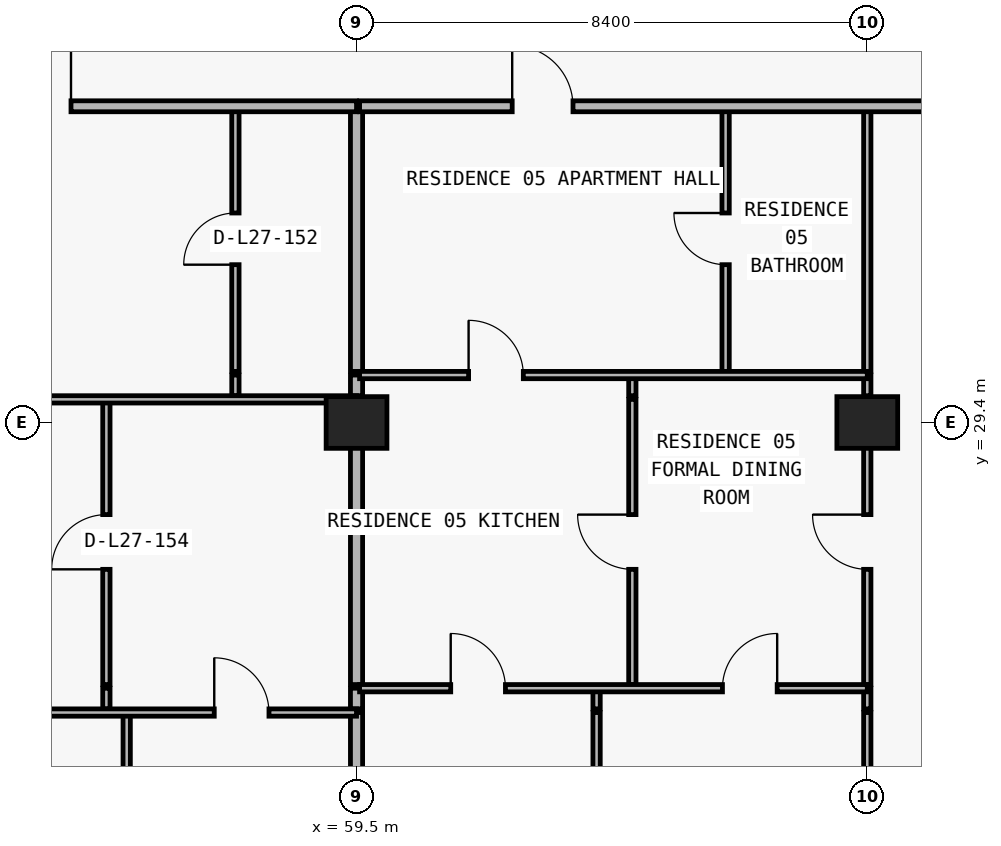
"""IFC4 building model, lengths in metres.
Left out: names, types, materials, properties, quantities, classifications, styles, units other than length and angle.
Written with IfcOpenShell. Run it as: python <this file> out.ifc"""

import sys

from ifc_helpers import new_model, si_unit, direction, frame, frame_2d, origin, origin_2d, place, context, subcontext, project, spatial, rectangle, extrude, element, fill, save


model = new_model("IFC4")
c1 = context("Model", 3, precision=1e-05, world=origin(), true_north=direction((0.0, 1.0)))
c2 = subcontext(c1, "Body", "Model", "MODEL_VIEW")
j1 = project(units=[si_unit("LENGTHUNIT", "METRE"), si_unit("PLANEANGLEUNIT", "RADIAN")], contexts=[c1])
p1 = place(None, origin())
s1 = spatial("IfcSite", under=j1, at=p1, CompositionType="ELEMENT")
p2 = place(p1, origin())
s2 = spatial("IfcBuilding", under=s1, at=p2, CompositionType="ELEMENT")
p3 = place(p2, frame((0.0, 0.0, 102.6)))
s3 = spatial("IfcBuildingStorey", under=s2, at=p3, CompositionType="ELEMENT", Elevation=102.6)
for number, where, z_axis, x_axis in (
    (1, (59.5, 29.4, 0.0), (0.0, 0.0, 1.0), (1.0, 0.0, 0.0)),
    (2, (67.9, 29.4, 0.0), (0.0, 0.0, 1.0), (1.0, 0.0, 0.0)),
):
    element("IfcColumn", number, at=place(p3, frame(where, z_axis=z_axis, x_axis=x_axis)), inside=s3, PredefinedType="COLUMN", context=c2, shape_type="SweptSolid", body=[
        extrude(rectangle(XDim=1.0, YDim=0.85, at=origin_2d()), origin(), (0.0, 0.0, 1.0), 3.05),
    ])
p4 = place(p3, frame((55.386, 24.69, 0.0), z_axis=(0.0, 0.0, 1.0), x_axis=(0.0, 1.0, 0.0)))
e3 = element("IfcWall", 3, at=p4, inside=s3, PredefinedType="PARTITIONING", context=c2, shape_type="SweptSolid", body=[
    extrude(rectangle(XDim=0.34, YDim=0.12, at=frame_2d((0.17, 0.0))), origin(), (0.0, 0.0, 1.0), 3.05),
])
p5 = place(p3, frame((55.386, 25.09, 0.0), z_axis=(0.0, 0.0, 1.0), x_axis=(0.0, 1.0, 0.0)))
e4 = element("IfcWall", 4, at=p5, inside=s3, PredefinedType="PARTITIONING", context=c2, shape_type="SweptSolid", body=[
    extrude(rectangle(XDim=4.69, YDim=0.12, at=frame_2d((2.345, 0.0))), origin(), (0.0, 0.0, 1.0), 2.725),
])
p6 = place(p5, frame((1.895, 0.0, 0.0)))
e5 = element("IfcOpeningElement", 5, at=p6, cuts=e4, PredefinedType="OPENING", context=c2, shape_type="SweptSolid", body=[
    extrude(rectangle(XDim=0.9, YDim=2.15, at=frame_2d((0.45, 1.075))), frame((0.0, 0.07, 0.0), z_axis=(0.0, -1.0, 0.0), x_axis=(1.0, 0.0, 0.0)), (0.0, 0.0, 1.0), 0.14),
])
p7 = place(p3, frame((55.72, 8.84, 0.0), z_axis=(0.0, 0.0, 1.0), x_axis=(0.0, 1.0, 0.0)))
e6 = element("IfcWall", 6, at=p7, inside=s3, PredefinedType="PARTITIONING", context=c2, shape_type="SweptSolid", body=[
    extrude(rectangle(XDim=15.79, YDim=0.12, at=frame_2d((7.895, 0.0))), origin(), (0.0, 0.0, 1.0), 3.05),
])
p8 = place(p3, frame((57.508, 29.84, 0.0), z_axis=(0.0, 0.0, 1.0), x_axis=(0.0, 1.0, 0.0)))
e7 = element("IfcWall", 7, at=p8, inside=s3, PredefinedType="PARTITIONING", context=c2, shape_type="SweptSolid", body=[
    extrude(rectangle(XDim=0.34, YDim=0.12, at=frame_2d((0.17, 0.0))), origin(), (0.0, 0.0, 1.0), 3.05),
])
p9 = place(p3, frame((57.508, 30.24, 0.0), z_axis=(0.0, 0.0, 1.0), x_axis=(0.0, 1.0, 0.0)))
e8 = element("IfcWall", 8, at=p9, inside=s3, PredefinedType="PARTITIONING", context=c2, shape_type="SweptSolid", body=[
    extrude(rectangle(XDim=4.36, YDim=0.12, at=frame_2d((2.18, 0.0))), origin(), (0.0, 0.0, 1.0), 3.05),
])
p10 = place(p9, frame((1.755, 0.0, 0.0)))
e9 = element("IfcOpeningElement", 9, at=p10, cuts=e8, PredefinedType="OPENING", context=c2, shape_type="SweptSolid", body=[
    extrude(rectangle(XDim=0.85, YDim=2.1, at=frame_2d((0.425, 1.05))), frame((0.0, 0.07, 0.0), z_axis=(0.0, -1.0, 0.0), x_axis=(1.0, 0.0, 0.0)), (0.0, 0.0, 1.0), 0.14),
])
p11 = place(p3, frame((59.5, 8.84, 0.0), z_axis=(0.0, 0.0, 1.0), x_axis=(0.0, 1.0, 0.0)))
e10 = element("IfcWall", 10, at=p11, inside=s3, PredefinedType="PARTITIONING", context=c2, shape_type="SweptSolid", body=[
    extrude(rectangle(XDim=15.79, YDim=0.2, at=frame_2d((7.895, 0.0))), origin(), (0.0, 0.0, 1.0), 2.174),
])
p12 = place(p3, frame((59.5, 24.69, 0.0), z_axis=(0.0, 0.0, 1.0), x_axis=(0.0, 1.0, 0.0)))
e11 = element("IfcWall", 11, at=p12, inside=s3, PredefinedType="PARTITIONING", context=c2, shape_type="SweptSolid", body=[
    extrude(rectangle(XDim=0.34, YDim=0.2, at=frame_2d((0.17, 0.0))), origin(), (0.0, 0.0, 1.0), 2.174),
])
p13 = place(p3, frame((59.5, 25.09, 0.0), z_axis=(0.0, 0.0, 1.0), x_axis=(0.0, 1.0, 0.0)))
e12 = element("IfcWall", 12, at=p13, inside=s3, PredefinedType="PARTITIONING", context=c2, shape_type="SweptSolid", body=[
    extrude(rectangle(XDim=4.69, YDim=0.2, at=frame_2d((2.345, 0.0))), origin(), (0.0, 0.0, 1.0), 2.174),
])
p14 = place(p3, frame((59.5, 29.84, 0.0), z_axis=(0.0, 0.0, 1.0), x_axis=(0.0, 1.0, 0.0)))
e13 = element("IfcWall", 13, at=p14, inside=s3, PredefinedType="PARTITIONING", context=c2, shape_type="SweptSolid", body=[
    extrude(rectangle(XDim=0.34, YDim=0.2, at=frame_2d((0.17, 0.0))), origin(), (0.0, 0.0, 1.0), 2.174),
])
p15 = place(p3, frame((59.5, 30.24, 0.0), z_axis=(0.0, 0.0, 1.0), x_axis=(0.0, 1.0, 0.0)))
e14 = element("IfcWall", 14, at=p15, inside=s3, PredefinedType="PARTITIONING", context=c2, shape_type="SweptSolid", body=[
    extrude(rectangle(XDim=4.36, YDim=0.2, at=frame_2d((2.18, 0.0))), origin(), (0.0, 0.0, 1.0), 2.174),
])
p16 = place(p3, frame((63.448, 8.84, 0.0), z_axis=(0.0, 0.0, 1.0), x_axis=(0.0, 1.0, 0.0)))
e15 = element("IfcWall", 15, at=p16, inside=s3, PredefinedType="PARTITIONING", context=c2, shape_type="SweptSolid", body=[
    extrude(rectangle(XDim=15.79, YDim=0.12, at=frame_2d((7.895, 0.0))), origin(), (0.0, 0.0, 1.0), 3.05),
])
p17 = place(p3, frame((63.448, 24.69, 0.0), z_axis=(0.0, 0.0, 1.0), x_axis=(0.0, 1.0, 0.0)))
e16 = element("IfcWall", 16, at=p17, inside=s3, PredefinedType="PARTITIONING", context=c2, shape_type="SweptSolid", body=[
    extrude(rectangle(XDim=0.34, YDim=0.12, at=frame_2d((0.17, 0.0))), origin(), (0.0, 0.0, 1.0), 3.05),
])
p18 = place(p3, frame((64.036, 25.09, 0.0), z_axis=(0.0, 0.0, 1.0), x_axis=(0.0, 1.0, 0.0)))
e17 = element("IfcWall", 17, at=p18, inside=s3, PredefinedType="PARTITIONING", context=c2, shape_type="SweptSolid", body=[
    extrude(rectangle(XDim=4.69, YDim=0.12, at=frame_2d((2.345, 0.0))), origin(), (0.0, 0.0, 1.0), 3.05),
])
p19 = place(p18, frame((1.895, 0.0, 0.0)))
e18 = element("IfcOpeningElement", 18, at=p19, cuts=e17, PredefinedType="OPENING", context=c2, shape_type="SweptSolid", body=[
    extrude(rectangle(XDim=0.9, YDim=2.15, at=frame_2d((0.45, 1.075))), frame((0.0, 0.07, 0.0), z_axis=(0.0, -1.0, 0.0), x_axis=(1.0, 0.0, 0.0)), (0.0, 0.0, 1.0), 0.14),
])
p20 = place(p3, frame((64.036, 29.84, 0.0), z_axis=(0.0, 0.0, 1.0), x_axis=(0.0, 1.0, 0.0)))
e19 = element("IfcWall", 19, at=p20, inside=s3, PredefinedType="PARTITIONING", context=c2, shape_type="SweptSolid", body=[
    extrude(rectangle(XDim=0.34, YDim=0.12, at=frame_2d((0.17, 0.0))), origin(), (0.0, 0.0, 1.0), 3.05),
])
p21 = place(p3, frame((65.57, 30.24, 0.0), z_axis=(0.0, 0.0, 1.0), x_axis=(0.0, 1.0, 0.0)))
e20 = element("IfcWall", 20, at=p21, inside=s3, PredefinedType="PARTITIONING", context=c2, shape_type="SweptSolid", body=[
    extrude(rectangle(XDim=4.36, YDim=0.12, at=frame_2d((2.18, 0.0))), origin(), (0.0, 0.0, 1.0), 3.05),
])
p22 = place(p21, frame((1.755, 0.0, 0.0)))
e21 = element("IfcOpeningElement", 21, at=p22, cuts=e20, PredefinedType="OPENING", context=c2, shape_type="SweptSolid", body=[
    extrude(rectangle(XDim=0.85, YDim=2.1, at=frame_2d((0.425, 1.05))), frame((0.0, 0.07, 0.0), z_axis=(0.0, -1.0, 0.0), x_axis=(1.0, 0.0, 0.0)), (0.0, 0.0, 1.0), 0.14),
])
p23 = place(p3, frame((67.9, 8.84, 0.0), z_axis=(0.0, 0.0, 1.0), x_axis=(0.0, 1.0, 0.0)))
e22 = element("IfcWall", 22, at=p23, inside=s3, PredefinedType="PARTITIONING", context=c2, shape_type="SweptSolid", body=[
    extrude(rectangle(XDim=15.79, YDim=0.12, at=frame_2d((7.895, 0.0))), origin(), (0.0, 0.0, 1.0), 2.174),
])
p24 = place(p3, frame((67.9, 24.69, 0.0), z_axis=(0.0, 0.0, 1.0), x_axis=(0.0, 1.0, 0.0)))
e23 = element("IfcWall", 23, at=p24, inside=s3, PredefinedType="PARTITIONING", context=c2, shape_type="SweptSolid", body=[
    extrude(rectangle(XDim=0.34, YDim=0.12, at=frame_2d((0.17, 0.0))), origin(), (0.0, 0.0, 1.0), 2.174),
])
p25 = place(p3, frame((67.9, 25.09, 0.0), z_axis=(0.0, 0.0, 1.0), x_axis=(0.0, 1.0, 0.0)))
e24 = element("IfcWall", 24, at=p25, inside=s3, PredefinedType="PARTITIONING", context=c2, shape_type="SweptSolid", body=[
    extrude(rectangle(XDim=4.69, YDim=0.12, at=frame_2d((2.345, 0.0))), origin(), (0.0, 0.0, 1.0), 2.174),
])
p26 = place(p25, frame((1.895, 0.0, 0.0)))
e25 = element("IfcOpeningElement", 25, at=p26, cuts=e24, PredefinedType="OPENING", context=c2, shape_type="SweptSolid", body=[
    extrude(rectangle(XDim=0.9, YDim=2.124, at=frame_2d((0.45, 1.062))), frame((0.0, 0.07, 0.0), z_axis=(0.0, -1.0, 0.0), x_axis=(1.0, 0.0, 0.0)), (0.0, 0.0, 1.0), 0.14),
])
p27 = place(p3, frame((67.9, 29.84, 0.0), z_axis=(0.0, 0.0, 1.0), x_axis=(0.0, 1.0, 0.0)))
e26 = element("IfcWall", 26, at=p27, inside=s3, PredefinedType="PARTITIONING", context=c2, shape_type="SweptSolid", body=[
    extrude(rectangle(XDim=0.34, YDim=0.12, at=frame_2d((0.17, 0.0))), origin(), (0.0, 0.0, 1.0), 2.174),
])
p28 = place(p3, frame((67.9, 30.24, 0.0), z_axis=(0.0, 0.0, 1.0), x_axis=(0.0, 1.0, 0.0)))
e27 = element("IfcWall", 27, at=p28, inside=s3, PredefinedType="PARTITIONING", context=c2, shape_type="SweptSolid", body=[
    extrude(rectangle(XDim=4.36, YDim=0.12, at=frame_2d((2.18, 0.0))), origin(), (0.0, 0.0, 1.0), 2.174),
])
p29 = place(p3, frame((51.32, 24.63, 0.0), z_axis=(0.0, 0.0, 1.0), x_axis=(1.0, 0.0, 0.0)))
e28 = element("IfcWall", 28, at=p29, inside=s3, PredefinedType="PARTITIONING", context=c2, shape_type="SweptSolid", body=[
    extrude(rectangle(XDim=8.18, YDim=0.12, at=frame_2d((4.09, 0.0))), origin(), (0.0, 0.0, 1.0), 3.05),
])
p30 = place(p29, frame((1.583, 0.0, 0.0)))
e29 = element("IfcOpeningElement", 29, at=p30, cuts=e28, PredefinedType="OPENING", context=c2, shape_type="SweptSolid", body=[
    extrude(rectangle(XDim=0.9, YDim=2.15, at=frame_2d((0.45, 1.075))), frame((0.0, 0.07, 0.0), z_axis=(0.0, -1.0, 0.0), x_axis=(1.0, 0.0, 0.0)), (0.0, 0.0, 1.0), 0.14),
])
p31 = place(p29, frame((5.84, 0.0, 0.0)))
e30 = element("IfcOpeningElement", 30, at=p31, cuts=e28, PredefinedType="OPENING", context=c2, shape_type="SweptSolid", body=[
    extrude(rectangle(XDim=0.9, YDim=2.15, at=frame_2d((0.45, 1.075))), frame((0.0, 0.07, 0.0), z_axis=(0.0, -1.0, 0.0), x_axis=(1.0, 0.0, 0.0)), (0.0, 0.0, 1.0), 0.14),
])
p32 = place(p3, frame((59.55, 25.03, 0.0), z_axis=(0.0, 0.0, 1.0), x_axis=(1.0, 0.0, 0.0)))
e31 = element("IfcWall", 31, at=p32, inside=s3, PredefinedType="PARTITIONING", context=c2, shape_type="SweptSolid", body=[
    extrude(rectangle(XDim=8.35, YDim=0.12, at=frame_2d((4.175, 0.0))), origin(), (0.0, 0.0, 1.0), 3.05),
])
p33 = place(p32, frame((1.499, 0.0, 0.0)))
e32 = element("IfcOpeningElement", 32, at=p33, cuts=e31, PredefinedType="OPENING", context=c2, shape_type="SweptSolid", body=[
    extrude(rectangle(XDim=0.9, YDim=2.15, at=frame_2d((0.45, 1.075))), frame((0.0, 0.07, 0.0), z_axis=(0.0, -1.0, 0.0), x_axis=(1.0, 0.0, 0.0)), (0.0, 0.0, 1.0), 0.14),
])
p34 = place(p32, frame((5.968, 0.0, 0.0)))
e33 = element("IfcOpeningElement", 33, at=p34, cuts=e31, PredefinedType="OPENING", context=c2, shape_type="SweptSolid", body=[
    extrude(rectangle(XDim=0.9, YDim=2.15, at=frame_2d((0.45, 1.075))), frame((0.0, 0.07, 0.0), z_axis=(0.0, -1.0, 0.0), x_axis=(1.0, 0.0, 0.0)), (0.0, 0.0, 1.0), 0.14),
])
p35 = place(p3, frame((51.1, 29.78, 0.0), z_axis=(0.0, 0.0, 1.0), x_axis=(1.0, 0.0, 0.0)))
e34 = element("IfcWall", 34, at=p35, inside=s3, PredefinedType="PARTITIONING", context=c2, shape_type="SweptSolid", body=[
    extrude(rectangle(XDim=8.4, YDim=0.12, at=frame_2d((4.2, 0.0))), origin(), (0.0, 0.0, 1.0), 3.05),
])
p36 = place(p35, frame((1.693, 0.0, 0.0)))
e35 = element("IfcOpeningElement", 35, at=p36, cuts=e34, PredefinedType="OPENING", context=c2, shape_type="SweptSolid", body=[
    extrude(rectangle(XDim=0.9, YDim=2.15, at=frame_2d((0.45, 1.075))), frame((0.0, 0.07, 0.0), z_axis=(0.0, -1.0, 0.0), x_axis=(1.0, 0.0, 0.0)), (0.0, 0.0, 1.0), 0.14),
])
p37 = place(p3, frame((59.55, 30.18, 0.0), z_axis=(0.0, 0.0, 1.0), x_axis=(1.0, 0.0, 0.0)))
e36 = element("IfcWall", 36, at=p37, inside=s3, PredefinedType="PARTITIONING", context=c2, shape_type="SweptSolid", body=[
    extrude(rectangle(XDim=8.35, YDim=0.12, at=frame_2d((4.175, 0.0))), origin(), (0.0, 0.0, 1.0), 3.05),
])
p38 = place(p37, frame((1.793, 0.0, 0.0)))
e37 = element("IfcOpeningElement", 37, at=p38, cuts=e36, PredefinedType="OPENING", context=c2, shape_type="SweptSolid", body=[
    extrude(rectangle(XDim=0.9, YDim=2.15, at=frame_2d((0.45, 1.075))), frame((0.0, 0.07, 0.0), z_axis=(0.0, -1.0, 0.0), x_axis=(1.0, 0.0, 0.0)), (0.0, 0.0, 1.0), 0.14),
])
p39 = place(p3, frame((18.3, 34.6, 0.0), z_axis=(0.0, 0.0, 1.0), x_axis=(1.0, 0.0, 0.0)))
e38 = element("IfcWall", 38, at=p39, inside=s3, PredefinedType="PARTITIONING", context=c2, shape_type="SweptSolid", body=[
    extrude(rectangle(XDim=41.2, YDim=0.18, at=frame_2d((20.6, 0.0))), origin(), (0.0, 0.0, 1.0), 3.05),
])
p40 = place(p39, frame((2.691, 0.0, 0.0)))
e39 = element("IfcOpeningElement", 39, at=p40, cuts=e38, PredefinedType="OPENING", context=c2, shape_type="SweptSolid", body=[
    extrude(rectangle(XDim=1.0, YDim=2.2, at=frame_2d((0.5, 1.1))), frame((0.0, 0.1, 0.0), z_axis=(0.0, -1.0, 0.0), x_axis=(1.0, 0.0, 0.0)), (0.0, 0.0, 1.0), 0.2),
])
p41 = place(p39, frame((11.212, 0.0, 0.0)))
e40 = element("IfcOpeningElement", 40, at=p41, cuts=e38, PredefinedType="OPENING", context=c2, shape_type="SweptSolid", body=[
    extrude(rectangle(XDim=1.0, YDim=2.2, at=frame_2d((0.5, 1.1))), frame((0.0, 0.1, 0.0), z_axis=(0.0, -1.0, 0.0), x_axis=(1.0, 0.0, 0.0)), (0.0, 0.0, 1.0), 0.2),
])
p42 = place(p39, frame((35.504, 0.0, 0.0)))
e41 = element("IfcOpeningElement", 41, at=p42, cuts=e38, PredefinedType="OPENING", context=c2, shape_type="SweptSolid", body=[
    extrude(rectangle(XDim=1.0, YDim=2.2, at=frame_2d((0.5, 1.1))), frame((0.0, 0.1, 0.0), z_axis=(0.0, -1.0, 0.0), x_axis=(1.0, 0.0, 0.0)), (0.0, 0.0, 1.0), 0.2),
])
p43 = place(p3, frame((59.55, 34.6, 0.0), z_axis=(0.0, 0.0, 1.0), x_axis=(1.0, 0.0, 0.0)))
e42 = element("IfcWall", 42, at=p43, inside=s3, PredefinedType="PARTITIONING", context=c2, shape_type="SweptSolid", body=[
    extrude(rectangle(XDim=10.55, YDim=0.18, at=frame_2d((5.275, 0.0))), origin(), (0.0, 0.0, 1.0), 3.05),
])
p44 = place(p43, frame((2.51, 0.0, 0.0)))
e43 = element("IfcOpeningElement", 43, at=p44, cuts=e42, PredefinedType="OPENING", context=c2, shape_type="SweptSolid", body=[
    extrude(rectangle(XDim=1.0, YDim=2.2, at=frame_2d((0.5, 1.1))), frame((0.0, 0.1, 0.0), z_axis=(0.0, -1.0, 0.0), x_axis=(1.0, 0.0, 0.0)), (0.0, 0.0, 1.0), 0.2),
])
p45 = place(p42, origin())
e44 = element("IfcDoor", 44, at=p45, inside=s3, OperationType="SINGLE_SWING_RIGHT", PredefinedType="DOOR", context=c2, shape_type="SweptSolid", body=[
    extrude(rectangle(XDim=1.0, YDim=2.2, at=frame_2d((0.5, 1.1))), frame((0.0, 0.025, 0.0), z_axis=(0.0, -1.0, 0.0), x_axis=(1.0, 0.0, 0.0)), (0.0, 0.0, 1.0), 0.05),
])
fill(e41, e44)
p46 = place(p10, origin())
e45 = element("IfcDoor", 45, at=p46, inside=s3, OperationType="SINGLE_SWING_LEFT", PredefinedType="DOOR", context=c2, shape_type="SweptSolid", body=[
    extrude(rectangle(XDim=0.85, YDim=2.1, at=frame_2d((0.425, 1.05))), frame((0.0, 0.025, 0.0), z_axis=(0.0, -1.0, 0.0), x_axis=(1.0, 0.0, 0.0)), (0.0, 0.0, 1.0), 0.05),
])
fill(e9, e45)
p47 = place(p6, origin())
e46 = element("IfcDoor", 46, at=p47, inside=s3, OperationType="SINGLE_SWING_LEFT", PredefinedType="DOOR", context=c2, shape_type="SweptSolid", body=[
    extrude(rectangle(XDim=0.9, YDim=2.15, at=frame_2d((0.45, 1.075))), frame((0.0, 0.025, 0.0), z_axis=(0.0, -1.0, 0.0), x_axis=(1.0, 0.0, 0.0)), (0.0, 0.0, 1.0), 0.05),
])
fill(e5, e46)
p48 = place(p31, origin())
e47 = element("IfcDoor", 47, at=p48, inside=s3, OperationType="SINGLE_SWING_LEFT", PredefinedType="DOOR", context=c2, shape_type="SweptSolid", body=[
    extrude(rectangle(XDim=0.9, YDim=2.15, at=frame_2d((0.45, 1.075))), frame((0.0, 0.025, 0.0), z_axis=(0.0, -1.0, 0.0), x_axis=(1.0, 0.0, 0.0)), (0.0, 0.0, 1.0), 0.05),
])
fill(e30, e47)
p49 = place(p44, origin())
e48 = element("IfcDoor", 48, at=p49, inside=s3, OperationType="SINGLE_SWING_LEFT", PredefinedType="DOOR", context=c2, shape_type="SweptSolid", body=[
    extrude(rectangle(XDim=1.0, YDim=2.2, at=frame_2d((0.5, 1.1))), frame((0.0, 0.025, 0.0), z_axis=(0.0, -1.0, 0.0), x_axis=(1.0, 0.0, 0.0)), (0.0, 0.0, 1.0), 0.05),
])
fill(e43, e48)
p50 = place(p22, origin())
e49 = element("IfcDoor", 49, at=p50, inside=s3, OperationType="SINGLE_SWING_RIGHT", PredefinedType="DOOR", context=c2, shape_type="SweptSolid", body=[
    extrude(rectangle(XDim=0.85, YDim=2.1, at=frame_2d((0.425, 1.05))), frame((0.0, 0.025, 0.0), z_axis=(0.0, -1.0, 0.0), x_axis=(1.0, 0.0, 0.0)), (0.0, 0.0, 1.0), 0.05),
])
fill(e21, e49)
p51 = place(p38, origin())
e50 = element("IfcDoor", 50, at=p51, inside=s3, OperationType="SINGLE_SWING_LEFT", PredefinedType="DOOR", context=c2, shape_type="SweptSolid", body=[
    extrude(rectangle(XDim=0.9, YDim=2.15, at=frame_2d((0.45, 1.075))), frame((0.0, 0.025, 0.0), z_axis=(0.0, -1.0, 0.0), x_axis=(1.0, 0.0, 0.0)), (0.0, 0.0, 1.0), 0.05),
])
fill(e37, e50)
p52 = place(p19, origin())
e51 = element("IfcDoor", 51, at=p52, inside=s3, OperationType="SINGLE_SWING_RIGHT", PredefinedType="DOOR", context=c2, shape_type="SweptSolid", body=[
    extrude(rectangle(XDim=0.9, YDim=2.15, at=frame_2d((0.45, 1.075))), frame((0.0, 0.025, 0.0), z_axis=(0.0, -1.0, 0.0), x_axis=(1.0, 0.0, 0.0)), (0.0, 0.0, 1.0), 0.05),
])
fill(e18, e51)
p53 = place(p33, origin())
e52 = element("IfcDoor", 52, at=p53, inside=s3, OperationType="SINGLE_SWING_LEFT", PredefinedType="DOOR", context=c2, shape_type="SweptSolid", body=[
    extrude(rectangle(XDim=0.9, YDim=2.15, at=frame_2d((0.45, 1.075))), frame((0.0, 0.025, 0.0), z_axis=(0.0, -1.0, 0.0), x_axis=(1.0, 0.0, 0.0)), (0.0, 0.0, 1.0), 0.05),
])
fill(e32, e52)
p54 = place(p34, origin())
e53 = element("IfcDoor", 53, at=p54, inside=s3, OperationType="SINGLE_SWING_RIGHT", PredefinedType="DOOR", context=c2, shape_type="SweptSolid", body=[
    extrude(rectangle(XDim=0.9, YDim=2.15, at=frame_2d((0.45, 1.075))), frame((0.0, 0.025, 0.0), z_axis=(0.0, -1.0, 0.0), x_axis=(1.0, 0.0, 0.0)), (0.0, 0.0, 1.0), 0.05),
])
fill(e33, e53)
p55 = place(p26, origin())
e54 = element("IfcDoor", 54, at=p55, inside=s3, OperationType="SINGLE_SWING_RIGHT", PredefinedType="DOOR", context=c2, shape_type="SweptSolid", body=[
    extrude(rectangle(XDim=0.9, YDim=2.124, at=frame_2d((0.45, 1.062))), frame((0.0, 0.025, 0.0), z_axis=(0.0, -1.0, 0.0), x_axis=(1.0, 0.0, 0.0)), (0.0, 0.0, 1.0), 0.05),
])
fill(e25, e54)
save(model, sys.argv[1])
